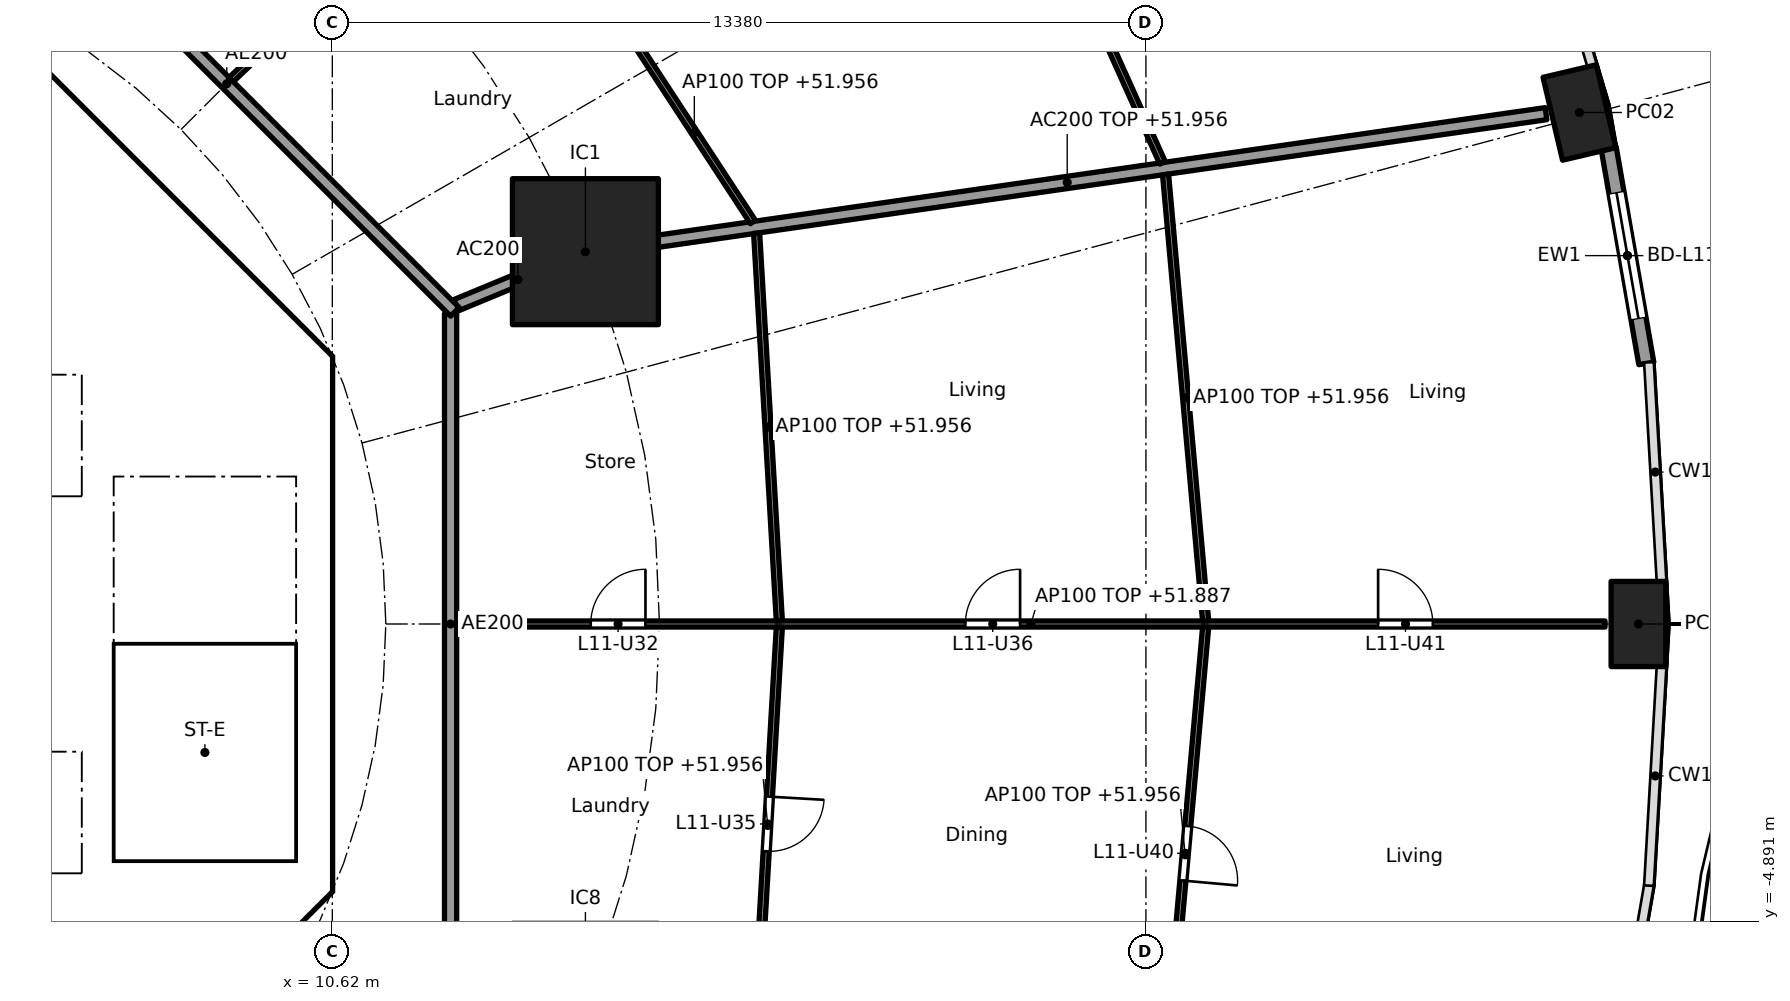
"""IFC4 building model, lengths in metres.
Left out: names, types, materials, properties, quantities, classifications, styles, units other than length and angle.
Written with IfcOpenShell. Run it as: python <this file> out.ifc"""

import sys

from ifc_helpers import new_model, si_unit, direction, frame, frame_2d, origin, origin_2d, place, context, subcontext, project, spatial, polyline, rectangle, hollow_rectangle, outline, extrude, element, fill, save


model = new_model("IFC4")
c1 = context("Model", 3, precision=1e-05, world=origin(), true_north=direction((0.0, 1.0)))
c2 = subcontext(c1, "Body", "Model", "MODEL_VIEW")
j1 = project(units=[si_unit("LENGTHUNIT", "METRE"), si_unit("PLANEANGLEUNIT", "RADIAN")], contexts=[c1])
p1 = place(None, origin())
s1 = spatial("IfcSite", under=j1, at=p1, CompositionType="ELEMENT")
p2 = place(p1, origin())
s2 = spatial("IfcBuilding", under=s1, at=p2, CompositionType="ELEMENT")
p3 = place(p2, frame((0.0, 0.0, 49.2)))
s3 = spatial("IfcBuildingStorey", under=s2, at=p3, CompositionType="ELEMENT", Elevation=49.2)
for number, where, z_axis, x_axis in (
    (1, (32.1, 0.0, 0.0), (0.0, 0.0, 1.0), (0.0, 1.0, 0.0)),
    (2, (31.129, 8.412, 0.0), (0.0, 0.0, 1.0), (-0.229, 0.973, 0.0)),
):
    element("IfcColumn", number, at=place(p3, frame(where, z_axis=z_axis, x_axis=x_axis)), inside=s3, PredefinedType="COLUMN", context=c2, shape_type="SweptSolid", body=[
        extrude(hollow_rectangle(XDim=1.4, YDim=0.9, WallThickness=0.05, at=origin_2d()), origin(), (0.0, 0.0, 1.0), 3.7),
    ])
p4 = place(p3, frame((14.782, 6.123, 0.0), z_axis=(0.0, 0.0, 1.0), x_axis=(1.0, 0.0, 0.0)))
e3 = element("IfcColumn", 3, at=p4, inside=s3, PredefinedType="COLUMN", context=c2, shape_type="SweptSolid", body=[
    extrude(rectangle(XDim=2.4, YDim=2.4, at=origin_2d()), origin(), (0.0, 0.0, 1.0), 3.7),
])
p5 = place(p3, frame((31.609, 7.83, 0.0), z_axis=(0.0, 0.0, 1.0), x_axis=(0.172217377323, -0.98505897029, 0.0)))
e4 = element("IfcWall", 4, at=p5, inside=s3, PredefinedType="SOLIDWALL", context=c2, shape_type="SweptSolid", body=[
    extrude(rectangle(XDim=3.598, YDim=0.25, at=frame_2d((1.799, 0.0))), origin(), (0.0, 0.0, 1.0), 3.44),
])
p6 = place(p5, frame((0.749, 0.0, 0.0)))
e5 = element("IfcOpeningElement", 5, at=p6, cuts=e4, PredefinedType="OPENING", context=c2, shape_type="SweptSolid", body=[
    extrude(rectangle(XDim=2.1, YDim=2.4, at=frame_2d((1.05, 1.2))), frame((0.0, 0.135, 0.0), z_axis=(0.0, -1.0, 0.0), x_axis=(1.0, 0.0, 0.0)), (0.0, 0.0, 1.0), 0.27),
])
p7 = place(p3, frame((9.988, 4.613, 0.0), z_axis=(0.0, 0.0, 1.0), x_axis=(-0.707106781187, 0.707106781187, 0.0)))
e6 = element("IfcWall", 6, at=p7, inside=s3, PredefinedType="SHEAR", context=c2, shape_type="SweptSolid", body=[
    extrude(rectangle(XDim=7.602, YDim=0.6, at=frame_2d((3.801, 0.0))), origin(), (0.0, 0.0, 1.0), 3.44),
])
p8 = place(p7, frame((3.201, 0.0, 0.0)))
e7 = element("IfcOpeningElement", 7, at=p8, cuts=e6, PredefinedType="OPENING", context=c2, shape_type="SweptSolid", body=[
    extrude(rectangle(XDim=1.2, YDim=2.1, at=frame_2d((0.6, 1.05))), frame((0.0, 0.31, 0.0), z_axis=(0.0, -1.0, 0.0), x_axis=(1.0, 0.0, 0.0)), (0.0, 0.0, 1.0), 0.62),
])
p9 = place(p3, frame((4.613, -9.988, 0.0), z_axis=(0.0, 0.0, 1.0), x_axis=(0.707106781187, 0.707106781187, 0.0)))
e8 = element("IfcWall", 8, at=p9, inside=s3, PredefinedType="SHEAR", context=c2, shape_type="SweptSolid", body=[
    extrude(rectangle(XDim=7.602, YDim=0.6, at=frame_2d((3.801, 0.0))), origin(), (0.0, 0.0, 1.0), 3.44),
])
p10 = place(p9, frame((3.201, 0.0, 0.0)))
e9 = element("IfcOpeningElement", 9, at=p10, cuts=e8, PredefinedType="OPENING", context=c2, shape_type="SweptSolid", body=[
    extrude(rectangle(XDim=1.2, YDim=2.1, at=frame_2d((0.6, 1.05))), frame((0.0, 0.31, 0.0), z_axis=(0.0, -1.0, 0.0), x_axis=(1.0, 0.0, 0.0)), (0.0, 0.0, 1.0), 0.62),
])
p11 = place(p3, frame((-6.7, 2.0, 0.0), z_axis=(0.0, 0.0, 1.0), x_axis=(1.0, 0.0, 0.0)))
e10 = element("IfcWall", 10, at=p11, inside=s3, PredefinedType="SOLIDWALL", context=c2, shape_type="SweptSolid", body=[
    extrude(rectangle(XDim=13.4, YDim=0.2, at=frame_2d((6.7, 0.0))), origin(), (0.0, 0.0, 1.0), 3.44),
])
p12 = place(p11, frame((0.65, 0.0, 0.0)))
e11 = element("IfcOpeningElement", 11, at=p12, cuts=e10, PredefinedType="OPENING", context=c2, shape_type="SweptSolid", body=[
    extrude(rectangle(XDim=1.1, YDim=2.1, at=frame_2d((0.55, 1.05))), frame((0.0, 0.11, 0.0), z_axis=(0.0, -1.0, 0.0), x_axis=(1.0, 0.0, 0.0)), (0.0, 0.0, 1.0), 0.22),
])
p13 = place(p11, frame((2.85, 0.0, 0.0)))
e12 = element("IfcOpeningElement", 12, at=p13, cuts=e10, PredefinedType="OPENING", context=c2, shape_type="SweptSolid", body=[
    extrude(rectangle(XDim=1.1, YDim=2.1, at=frame_2d((0.55, 1.05))), frame((0.0, 0.11, 0.0), z_axis=(0.0, -1.0, 0.0), x_axis=(1.0, 0.0, 0.0)), (0.0, 0.0, 1.0), 0.22),
])
p14 = place(p11, frame((5.05, 0.0, 0.0)))
e13 = element("IfcOpeningElement", 13, at=p14, cuts=e10, PredefinedType="OPENING", context=c2, shape_type="SweptSolid", body=[
    extrude(rectangle(XDim=1.1, YDim=2.1, at=frame_2d((0.55, 1.05))), frame((0.0, 0.11, 0.0), z_axis=(0.0, -1.0, 0.0), x_axis=(1.0, 0.0, 0.0)), (0.0, 0.0, 1.0), 0.22),
])
p15 = place(p3, frame((6.7, 4.0, 0.0), z_axis=(0.0, 0.0, 1.0), x_axis=(1.0, 0.0, 0.0)))
e14 = element("IfcWall", 14, at=p15, inside=s3, PredefinedType="SOLIDWALL", context=c2, shape_type="SweptSolid", body=[
    extrude(rectangle(XDim=3.325, YDim=0.2, at=frame_2d((1.662, 0.0))), origin(), (0.0, 0.0, 1.0), 3.44),
])
p16 = place(p15, frame((1.25, 0.0, 0.0)))
e15 = element("IfcOpeningElement", 15, at=p16, cuts=e14, PredefinedType="OPENING", context=c2, shape_type="SweptSolid", body=[
    extrude(rectangle(XDim=1.1, YDim=2.1, at=frame_2d((0.55, 1.05))), frame((0.0, 0.11, 0.0), z_axis=(0.0, -1.0, 0.0), x_axis=(1.0, 0.0, 0.0)), (0.0, 0.0, 1.0), 0.22),
])
p17 = place(p3, frame((-6.7, -2.0, 0.0), z_axis=(0.0, 0.0, 1.0), x_axis=(1.0, 0.0, 0.0)))
e16 = element("IfcWall", 16, at=p17, inside=s3, PredefinedType="SOLIDWALL", context=c2, shape_type="SweptSolid", body=[
    extrude(rectangle(XDim=13.4, YDim=0.2, at=frame_2d((6.7, 0.0))), origin(), (0.0, 0.0, 1.0), 3.44),
])
p18 = place(p17, frame((0.65, 0.0, 0.0)))
e17 = element("IfcOpeningElement", 17, at=p18, cuts=e16, PredefinedType="OPENING", context=c2, shape_type="SweptSolid", body=[
    extrude(rectangle(XDim=1.1, YDim=2.1, at=frame_2d((0.55, 1.05))), frame((0.0, 0.11, 0.0), z_axis=(0.0, -1.0, 0.0), x_axis=(1.0, 0.0, 0.0)), (0.0, 0.0, 1.0), 0.22),
])
p19 = place(p17, frame((2.85, 0.0, 0.0)))
e18 = element("IfcOpeningElement", 18, at=p19, cuts=e16, PredefinedType="OPENING", context=c2, shape_type="SweptSolid", body=[
    extrude(rectangle(XDim=1.1, YDim=2.1, at=frame_2d((0.55, 1.05))), frame((0.0, 0.11, 0.0), z_axis=(0.0, -1.0, 0.0), x_axis=(1.0, 0.0, 0.0)), (0.0, 0.0, 1.0), 0.22),
])
p20 = place(p3, origin())
e19 = element("IfcWall", 19, at=p20, inside=s3, PredefinedType="SHEAR", context=c2, shape_type="SweptSolid", body=[
    extrude(outline(polyline([(9.776, -4.401), (10.025, -4.152), (10.025, -3.801), (10.025, 4.152), (9.776, 4.401), (10.2, 4.825), (10.625, 4.401), (10.625, -4.401), (10.2, -4.825), (9.776, -4.401)])), origin(), (0.0, 0.0, 1.0), 3.44),
])
p21 = place(p3, origin())
e20 = element("IfcWall", 20, at=p21, inside=s3, PredefinedType="SOLIDWALL", context=c2, shape_type="SweptSolid", body=[
    extrude(outline(polyline([(-6.7, -2.1), (-6.5, -2.1), (-6.5, -4.1), (-4.5, -4.1), (-4.5, -2.1), (-4.3, -2.1), (-4.3, -4.1), (-2.3, -4.1), (-2.3, -2.1), (-2.1, -2.1), (-2.1, -4.1), (-0.1, -4.1), (-0.1, -2.1), (0.1, -2.1), (0.1, -4.1), (2.1, -4.1), (2.1, -2.1), (2.3, -2.1), (2.3, -4.1), (4.3, -4.1), (4.3, -2.1), (4.5, -2.1), (4.5, -4.1), (6.5, -4.1), (6.5, -2.1), (6.7, -2.1), (6.7, -4.3), (-6.7, -4.3), (-6.7, -2.1)])), origin(), (0.0, 0.0, 1.0), 3.44),
])
p22 = place(p3, origin())
e21 = element("IfcWall", 21, at=p22, inside=s3, PredefinedType="SOLIDWALL", context=c2, shape_type="SweptSolid", body=[
    extrude(outline(polyline([(-6.5, 2.1), (-6.7, 2.1), (-6.7, 4.3), (6.7, 4.3), (6.7, 2.1), (6.5, 2.1), (6.5, 4.1), (4.5, 4.1), (4.5, 2.1), (4.3, 2.1), (4.3, 4.1), (2.3, 4.1), (2.3, 2.1), (2.1, 2.1), (2.1, 4.1), (0.1, 4.1), (0.1, 2.1), (-0.1, 2.1), (-0.1, 4.1), (-2.1, 4.1), (-2.1, 2.1), (-2.3, 2.1), (-2.3, 4.1), (-4.3, 4.1), (-4.3, 2.1), (-4.5, 2.1), (-4.5, 4.1), (-6.5, 4.1), (-6.5, 2.1)])), origin(), (0.0, 0.0, 1.0), 3.44),
])
p23 = place(p3, origin())
e22 = element("IfcWall", 22, at=p23, inside=s3, PredefinedType="SOLIDWALL", context=c2, shape_type="SweptSolid", body=[
    extrude(outline(polyline([(7.025, -3.9), (6.7, -3.9), (6.7, 3.9), (7.025, 3.9), (7.025, -3.9)])), origin(), (0.0, 0.0, 1.0), 3.44),
])
p24 = place(p3, origin())
e23 = element("IfcWall", 23, at=p24, inside=s3, PredefinedType="SOLIDWALL", context=c2, shape_type="SweptSolid", body=[
    extrude(outline(polyline([(10.025, -4.1), (6.7, -4.1), (6.7, -3.9), (10.025, -3.9), (10.025, -4.1)])), origin(), (0.0, 0.0, 1.0), 3.44),
])
p25 = place(p3, frame((12.657, 5.243, 0.0), z_axis=(0.0, 0.0, 1.0), x_axis=(0.923853160736, 0.382747093259, 0.0)))
e24 = element("IfcWall", 24, at=p25, inside=s3, PredefinedType="PARTITIONING", context=c2, shape_type="SweptSolid", body=[
    extrude(rectangle(XDim=2.2, YDim=0.2, at=frame_2d((1.1, 0.0))), origin(), (0.0, 0.0, 1.0), 3.44),
])
p26 = place(p3, frame((14.832, 6.13, 0.0), z_axis=(0.0, 0.0, 1.0), x_axis=(0.989836541293, 0.142209779978, 0.0)))
e25 = element("IfcWall", 25, at=p26, inside=s3, PredefinedType="PARTITIONING", context=c2, shape_type="SweptSolid", body=[
    extrude(rectangle(XDim=15.909, YDim=0.2, at=frame_2d((7.955, 0.0))), origin(), (0.0, 0.0, 1.0), 2.756),
])
p27 = place(p3, frame((12.565, -5.104, 0.0), z_axis=(0.0, 0.0, 1.0), x_axis=(0.0, 1.0, 0.0)))
e26 = element("IfcWall", 26, at=p27, inside=s3, PredefinedType="PARTITIONING", context=c2, shape_type="SweptSolid", body=[
    extrude(rectangle(XDim=10.209, YDim=0.2, at=frame_2d((5.104, 0.0))), origin(), (0.0, 0.0, 1.0), 3.44),
])
p28 = place(p3, frame((12.635, 5.134, 0.0), z_axis=(0.0, 0.0, 1.0), x_axis=(-0.707106781187, 0.707106781187, 0.0)))
e27 = element("IfcWall", 27, at=p28, inside=s3, PredefinedType="PARTITIONING", context=c2, shape_type="SweptSolid", body=[
    extrude(rectangle(XDim=10.609, YDim=0.2, at=frame_2d((5.305, 0.0))), origin(), (0.0, 0.0, 1.0), 3.44),
])
p29 = place(p3, frame((12.665, 0.0, 0.0), z_axis=(0.0, 0.0, 1.0), x_axis=(1.0, 0.0, 0.0)))
e28 = element("IfcWall", 28, at=p29, inside=s3, PredefinedType="PARTITIONING", context=c2, shape_type="SweptSolid", body=[
    extrude(rectangle(XDim=18.885, YDim=0.1, at=frame_2d((9.443, 0.0))), origin(), (0.0, 0.0, 1.0), 2.687),
])
p30 = place(p29, frame((2.205, 0.0, 0.0)))
e29 = element("IfcOpeningElement", 29, at=p30, cuts=e28, PredefinedType="OPENING", context=c2, shape_type="SweptSolid", body=[
    extrude(rectangle(XDim=0.9, YDim=2.1, at=frame_2d((0.45, 1.05))), frame((0.0, 0.06, 0.0), z_axis=(0.0, -1.0, 0.0), x_axis=(1.0, 0.0, 0.0)), (0.0, 0.0, 1.0), 0.12),
])
p31 = place(p29, frame((8.366, 0.0, 0.0)))
e30 = element("IfcOpeningElement", 30, at=p31, cuts=e28, PredefinedType="OPENING", context=c2, shape_type="SweptSolid", body=[
    extrude(rectangle(XDim=0.9, YDim=2.1, at=frame_2d((0.45, 1.05))), frame((0.0, 0.06, 0.0), z_axis=(0.0, -1.0, 0.0), x_axis=(1.0, 0.0, 0.0)), (0.0, 0.0, 1.0), 0.12),
])
p32 = place(p29, frame((15.154, 0.0, 0.0)))
e31 = element("IfcOpeningElement", 31, at=p32, cuts=e28, PredefinedType="OPENING", context=c2, shape_type="SweptSolid", body=[
    extrude(rectangle(XDim=0.9, YDim=2.1, at=frame_2d((0.45, 1.05))), frame((0.0, 0.06, 0.0), z_axis=(0.0, -1.0, 0.0), x_axis=(1.0, 0.0, 0.0)), (0.0, 0.0, 1.0), 0.12),
])
p33 = place(p3, frame((17.971, 0.05, 0.0), z_axis=(0.0, 0.0, 1.0), x_axis=(-0.058513659907, 0.998286607946, 0.0)))
e32 = element("IfcWall", 32, at=p33, inside=s3, PredefinedType="PARTITIONING", context=c2, shape_type="SweptSolid", body=[
    extrude(rectangle(XDim=6.388, YDim=0.1, at=frame_2d((3.194, 0.0))), origin(), (0.0, 0.0, 1.0), 2.756),
])
p34 = place(p3, frame((17.971, -0.05, 0.0), z_axis=(0.0, 0.0, 1.0), x_axis=(-0.058476853647, -0.998288764631, 0.0)))
e33 = element("IfcWall", 33, at=p34, inside=s3, PredefinedType="PARTITIONING", context=c2, shape_type="SweptSolid", body=[
    extrude(rectangle(XDim=6.538, YDim=0.1, at=frame_2d((3.269, 0.0))), origin(), (0.0, 0.0, 1.0), 2.756),
])
p35 = place(p34, frame((2.794, 0.0, 0.0)))
e34 = element("IfcOpeningElement", 34, at=p35, cuts=e33, PredefinedType="OPENING", context=c2, shape_type="SweptSolid", body=[
    extrude(rectangle(XDim=0.9, YDim=2.1, at=frame_2d((0.45, 1.05))), frame((0.0, 0.06, 0.0), z_axis=(0.0, -1.0, 0.0), x_axis=(1.0, 0.0, 0.0)), (0.0, 0.0, 1.0), 0.12),
])
p36 = place(p3, frame((24.982, 0.05, 0.0), z_axis=(0.0, 0.0, 1.0), x_axis=(-0.08944290521, 0.995991951126, 0.0)))
e35 = element("IfcWall", 35, at=p36, inside=s3, PredefinedType="PARTITIONING", context=c2, shape_type="SweptSolid", body=[
    extrude(rectangle(XDim=7.373, YDim=0.1, at=frame_2d((3.686, 0.0))), origin(), (0.0, 0.0, 1.0), 2.756),
])
p37 = place(p3, frame((24.982, -0.05, 0.0), z_axis=(0.0, 0.0, 1.0), x_axis=(-0.089444214321, -0.995991833563, 0.0)))
e36 = element("IfcWall", 36, at=p37, inside=s3, PredefinedType="PARTITIONING", context=c2, shape_type="SweptSolid", body=[
    extrude(rectangle(XDim=7.523, YDim=0.1, at=frame_2d((3.761, 0.0))), origin(), (0.0, 0.0, 1.0), 2.756),
])
p38 = place(p37, frame((3.286, 0.0, 0.0)))
e37 = element("IfcOpeningElement", 37, at=p38, cuts=e36, PredefinedType="OPENING", context=c2, shape_type="SweptSolid", body=[
    extrude(rectangle(XDim=0.9, YDim=2.1, at=frame_2d((0.45, 1.05))), frame((0.0, 0.06, 0.0), z_axis=(0.0, -1.0, 0.0), x_axis=(1.0, 0.0, 0.0)), (0.0, 0.0, 1.0), 0.12),
])
p39 = place(p3, frame((17.537, 6.61, 0.0), z_axis=(0.0, 0.0, 1.0), x_axis=(-0.547637987196, 0.836715384692, 0.0)))
e38 = element("IfcWall", 38, at=p39, inside=s3, PredefinedType="PARTITIONING", context=c2, shape_type="SweptSolid", body=[
    extrude(rectangle(XDim=3.52, YDim=0.1, at=frame_2d((1.76, 0.0))), origin(), (0.0, 0.0, 1.0), 2.756),
])
p40 = place(p3, frame((24.273, 7.584, 0.0), z_axis=(0.0, 0.0, 1.0), x_axis=(-0.410201529109, 0.911994904326, 0.0)))
e39 = element("IfcWall", 39, at=p40, inside=s3, PredefinedType="PARTITIONING", context=c2, shape_type="SweptSolid", body=[
    extrude(rectangle(XDim=5.787, YDim=0.1, at=frame_2d((2.894, 0.0))), origin(), (0.0, 0.0, 1.0), 2.756),
])
p41 = place(p3, frame((8.957, 8.953, 0.0), z_axis=(0.0, 0.0, 1.0), x_axis=(0.725250022034, 0.688485588476, 0.0)))
e40 = element("IfcWall", 40, at=p41, inside=s3, PredefinedType="PARTITIONING", context=c2, shape_type="SweptSolid", body=[
    extrude(rectangle(XDim=12.963, YDim=0.1, at=frame_2d((6.481, 0.0))), origin(), (0.0, 0.0, 1.0), 2.687),
])
p42 = place(p41, frame((2.333, 0.0, 0.0)))
e41 = element("IfcOpeningElement", 41, at=p42, cuts=e40, PredefinedType="OPENING", context=c2, shape_type="SweptSolid", body=[
    extrude(rectangle(XDim=0.9, YDim=2.1, at=frame_2d((0.45, 1.05))), frame((0.0, 0.06, 0.0), z_axis=(0.0, -1.0, 0.0), x_axis=(1.0, 0.0, 0.0)), (0.0, 0.0, 1.0), 0.12),
])
p43 = place(p41, frame((8.79, 0.0, 0.0)))
e42 = element("IfcOpeningElement", 42, at=p43, cuts=e40, PredefinedType="OPENING", context=c2, shape_type="SweptSolid", body=[
    extrude(rectangle(XDim=0.9, YDim=2.1, at=frame_2d((0.45, 1.05))), frame((0.0, 0.06, 0.0), z_axis=(0.0, -1.0, 0.0), x_axis=(1.0, 0.0, 0.0)), (0.0, 0.0, 1.0), 0.12),
])
p44 = place(p6, origin())
e43 = element("IfcDoor", 43, at=p44, inside=s3, OperationType="SLIDING_TO_LEFT", PredefinedType="DOOR", context=c2, shape_type="SweptSolid", body=[
    extrude(rectangle(XDim=2.1, YDim=2.4, at=frame_2d((1.05, 1.2))), frame((0.0, 0.025, 0.0), z_axis=(0.0, -1.0, 0.0), x_axis=(1.0, 0.0, 0.0)), (0.0, 0.0, 1.0), 0.05),
])
fill(e5, e43)
p45 = place(p16, frame((1.1, 0.0, 0.0), x_axis=(-1.0, 0.0, 0.0)))
e44 = element("IfcDoor", 44, at=p45, inside=s3, OperationType="SINGLE_SWING_LEFT", PredefinedType="DOOR", context=c2, shape_type="SweptSolid", body=[
    extrude(rectangle(XDim=1.1, YDim=2.1, at=frame_2d((0.55, 1.05))), frame((0.0, 0.025, 0.0), z_axis=(0.0, -1.0, 0.0), x_axis=(1.0, 0.0, 0.0)), (0.0, 0.0, 1.0), 0.05),
])
fill(e15, e44)
p46 = place(p8, origin())
e45 = element("IfcDoor", 45, at=p46, inside=s3, OperationType="SINGLE_SWING_RIGHT", PredefinedType="DOOR", context=c2, shape_type="SweptSolid", body=[
    extrude(rectangle(XDim=1.2, YDim=2.1, at=frame_2d((0.6, 1.05))), frame((0.0, 0.025, 0.0), z_axis=(0.0, -1.0, 0.0), x_axis=(1.0, 0.0, 0.0)), (0.0, 0.0, 1.0), 0.05),
])
fill(e7, e45)
p47 = place(p30, origin())
e46 = element("IfcDoor", 46, at=p47, inside=s3, OperationType="SINGLE_SWING_RIGHT", PredefinedType="DOOR", context=c2, shape_type="SweptSolid", body=[
    extrude(rectangle(XDim=0.9, YDim=2.1, at=frame_2d((0.45, 1.05))), frame((0.0, 0.025, 0.0), z_axis=(0.0, -1.0, 0.0), x_axis=(1.0, 0.0, 0.0)), (0.0, 0.0, 1.0), 0.05),
])
fill(e29, e46)
p48 = place(p35, origin())
e47 = element("IfcDoor", 47, at=p48, inside=s3, OperationType="SINGLE_SWING_LEFT", PredefinedType="DOOR", context=c2, shape_type="SweptSolid", body=[
    extrude(rectangle(XDim=0.9, YDim=2.1, at=frame_2d((0.45, 1.05))), frame((0.0, 0.025, 0.0), z_axis=(0.0, -1.0, 0.0), x_axis=(1.0, 0.0, 0.0)), (0.0, 0.0, 1.0), 0.05),
])
fill(e34, e47)
p49 = place(p31, origin())
e48 = element("IfcDoor", 48, at=p49, inside=s3, OperationType="SINGLE_SWING_RIGHT", PredefinedType="DOOR", context=c2, shape_type="SweptSolid", body=[
    extrude(rectangle(XDim=0.9, YDim=2.1, at=frame_2d((0.45, 1.05))), frame((0.0, 0.025, 0.0), z_axis=(0.0, -1.0, 0.0), x_axis=(1.0, 0.0, 0.0)), (0.0, 0.0, 1.0), 0.05),
])
fill(e30, e48)
p50 = place(p38, origin())
e49 = element("IfcDoor", 49, at=p50, inside=s3, OperationType="SINGLE_SWING_RIGHT", PredefinedType="DOOR", context=c2, shape_type="SweptSolid", body=[
    extrude(rectangle(XDim=0.9, YDim=2.1, at=frame_2d((0.45, 1.05))), frame((0.0, 0.025, 0.0), z_axis=(0.0, -1.0, 0.0), x_axis=(1.0, 0.0, 0.0)), (0.0, 0.0, 1.0), 0.05),
])
fill(e37, e49)
p51 = place(p32, origin())
e50 = element("IfcDoor", 50, at=p51, inside=s3, OperationType="SINGLE_SWING_LEFT", PredefinedType="DOOR", context=c2, shape_type="SweptSolid", body=[
    extrude(rectangle(XDim=0.9, YDim=2.1, at=frame_2d((0.45, 1.05))), frame((0.0, 0.025, 0.0), z_axis=(0.0, -1.0, 0.0), x_axis=(1.0, 0.0, 0.0)), (0.0, 0.0, 1.0), 0.05),
])
fill(e31, e50)
save(model, sys.argv[1])
